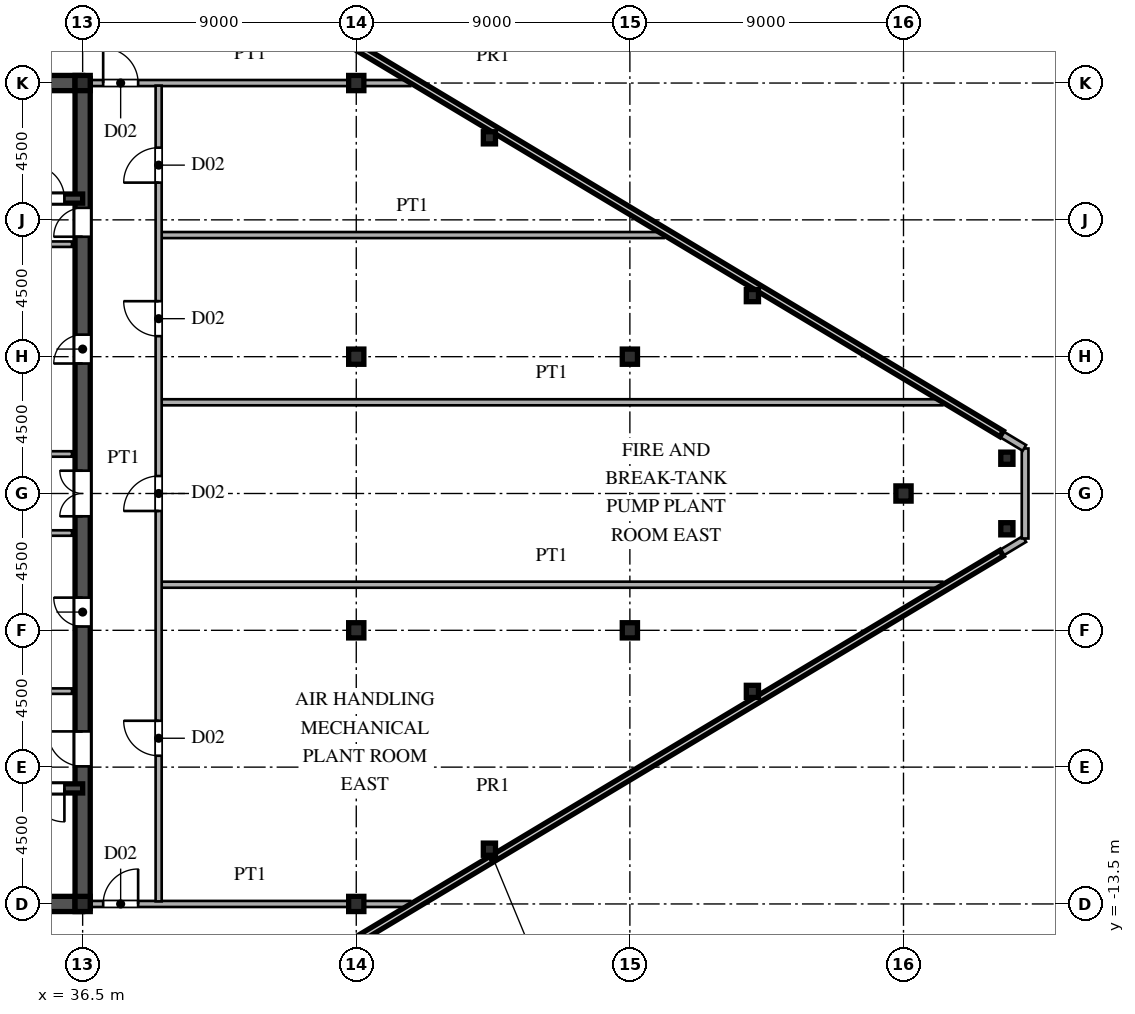
"""IFC4 building model, lengths in metres.
Left out: names, types, materials, properties, quantities, classifications, styles, units other than length and angle.
Written with IfcOpenShell. Run it as: python <this file> out.ifc"""

import sys

from ifc_helpers import new_model, si_unit, direction, frame, frame_2d, origin, origin_2d, place, context, subcontext, project, spatial, rectangle, hollow_rectangle, i_section, extrude, source, transform, mapped, element, fill, save


model = new_model("IFC4")
c1 = context("Model", 3, precision=1e-05, world=origin(), true_north=direction((0.0, 1.0)))
c2 = subcontext(c1, "Body", "Model", "MODEL_VIEW")
j1 = project(units=[si_unit("LENGTHUNIT", "METRE"), si_unit("PLANEANGLEUNIT", "RADIAN")], contexts=[c1])
p1 = place(None, origin())
s1 = spatial("IfcSite", under=j1, at=p1, CompositionType="ELEMENT")
p2 = place(p1, origin())
s2 = spatial("IfcBuilding", under=s1, at=p2, CompositionType="ELEMENT")
p3 = place(p2, frame((0.0, 0.0, 224.7)))
s3 = spatial("IfcBuildingStorey", under=s2, at=p3, CompositionType="ELEMENT", Elevation=224.7)
m1 = source(origin(), c2, "Body", "SweptSolid", [
    extrude(i_section(OverallWidth=0.5, OverallDepth=0.5, WebThickness=0.02, FlangeThickness=0.032, at=origin_2d()), origin(), (0.0, 0.0, 1.0), 5.1),
])
for number, where, z_axis, x_axis in (
    (1, (36.5, -13.5, 0.0), (0.0, 0.0, 1.0), (1.0, 0.0, 0.0)),
    (2, (36.5, 13.5, 0.0), (0.0, 0.0, 1.0), (1.0, 0.0, 0.0)),
    (3, (45.5, -13.5, 0.0), (0.0, 0.0, 1.0), (1.0, 0.0, 0.0)),
    (4, (45.5, -4.5, 0.0), (0.0, 0.0, 1.0), (1.0, 0.0, 0.0)),
    (5, (45.5, 4.5, 0.0), (0.0, 0.0, 1.0), (1.0, 0.0, 0.0)),
    (6, (45.5, 13.5, 0.0), (0.0, 0.0, 1.0), (1.0, 0.0, 0.0)),
    (7, (54.5, -4.5, 0.0), (0.0, 0.0, 1.0), (1.0, 0.0, 0.0)),
    (8, (54.5, 4.5, 0.0), (0.0, 0.0, 1.0), (1.0, 0.0, 0.0)),
    (9, (63.5, 0.0, 0.0), (0.0, 0.0, 1.0), (1.0, 0.0, 0.0)),
):
    element("IfcColumn", number, at=place(p3, frame(where, z_axis=z_axis, x_axis=x_axis)), inside=s3, PredefinedType="COLUMN", context=c2, shape_type="MappedRepresentation", body=[
        mapped(m1, transform((0.0, 0.0, 0.0), scale=1.0)),
    ])
m2 = source(origin(), c2, "Body", "SweptSolid", [
    extrude(hollow_rectangle(XDim=0.4, YDim=0.4, WallThickness=0.016, at=origin_2d()), origin(), (0.0, 0.0, 1.0), 5.1),
])
for number, where, z_axis, x_axis in (
    (10, (66.9, -1.16, 0.0), (0.0, 0.0, 1.0), (1.0, 0.0, 0.0)),
    (11, (66.9, 1.16, 0.0), (0.0, 0.0, 1.0), (1.0, 0.0, 0.0)),
    (12, (49.88, -11.699, 0.0), (0.0, 0.0, 1.0), (1.0, 0.0, 0.0)),
    (13, (58.53, -6.509, 0.0), (0.0, 0.0, 1.0), (1.0, 0.0, 0.0)),
    (14, (49.88, 11.699, 0.0), (0.0, 0.0, 1.0), (1.0, 0.0, 0.0)),
    (15, (58.53, 6.509, 0.0), (0.0, 0.0, 1.0), (1.0, 0.0, 0.0)),
):
    element("IfcColumn", number, at=place(p3, frame(where, z_axis=z_axis, x_axis=x_axis)), inside=s3, PredefinedType="COLUMN", context=c2, shape_type="MappedRepresentation", body=[
        mapped(m2, transform((0.0, 0.0, 0.0), scale=1.0)),
    ])
p4 = place(p3, frame((32.517, -22.49, 0.0), z_axis=(0.0, 0.0, 1.0), x_axis=(0.857492925713, 0.514495755428, 0.0)))
e16 = element("IfcWall", 16, at=p4, inside=s3, PredefinedType="PARAPET", context=c2, shape_type="SweptSolid", body=[
    extrude(rectangle(XDim=40.777, YDim=0.22, at=frame_2d((20.388, 0.0))), origin(), (0.0, 0.0, 1.0), 1.25),
])
p5 = place(p3, frame((67.5, -1.48, 0.0), z_axis=(0.0, 0.0, 1.0), x_axis=(0.0, 1.0, 0.0)))
e17 = element("IfcWall", 17, at=p5, inside=s3, PredefinedType="PARAPET", context=c2, shape_type="SweptSolid", body=[
    extrude(rectangle(XDim=2.96, YDim=0.22, at=frame_2d((1.48, 0.0))), origin(), (0.0, 0.0, 1.0), 1.25),
])
p6 = place(p3, frame((67.483, 1.51, 0.0), z_axis=(0.0, 0.0, 1.0), x_axis=(-0.857492925713, 0.514495755428, 0.0)))
e18 = element("IfcWall", 18, at=p6, inside=s3, PredefinedType="PARAPET", context=c2, shape_type="SweptSolid", body=[
    extrude(rectangle(XDim=40.777, YDim=0.22, at=frame_2d((20.388, 0.0))), origin(), (0.0, 0.0, 1.0), 1.25),
])
for number, where, z_axis, x_axis in (
    (19, (27.5, -13.5, 0.0), (0.0, 0.0, 1.0), (1.0, 0.0, 0.0)),
    (20, (27.5, 13.5, 0.0), (0.0, 0.0, 1.0), (1.0, 0.0, 0.0)),
):
    element("IfcWall", number, at=place(p3, frame(where, z_axis=z_axis, x_axis=x_axis)), inside=s3, PredefinedType="SHEAR", context=c2, shape_type="SweptSolid", body=[
        extrude(rectangle(XDim=9.0, YDim=0.5, at=frame_2d((4.5, 0.0))), origin(), (0.0, 0.0, 1.0), 4.84),
    ])
p7 = place(p3, frame((36.5, -13.65, 0.0), z_axis=(0.0, 0.0, 1.0), x_axis=(0.0, 1.0, 0.0)))
e21 = element("IfcWall", 21, at=p7, inside=s3, PredefinedType="SHEAR", context=c2, shape_type="SweptSolid", body=[
    extrude(rectangle(XDim=7.15, YDim=0.5, at=frame_2d((3.575, 0.0))), origin(), (0.0, 0.0, 1.0), 4.84),
])
p8 = place(p7, frame((4.675, 0.0, 0.0)))
e22 = element("IfcOpeningElement", 22, at=p8, cuts=e21, PredefinedType="OPENING", context=c2, shape_type="SweptSolid", body=[
    extrude(rectangle(XDim=1.15, YDim=2.2, at=frame_2d((0.575, 1.1))), frame((0.0, 0.26, 0.0), z_axis=(0.0, -1.0, 0.0), x_axis=(1.0, 0.0, 0.0)), (0.0, 0.0, 1.0), 0.52),
])
p9 = place(p3, frame((36.5, -1.3, 0.0), z_axis=(0.0, 0.0, 1.0), x_axis=(0.0, 1.0, 0.0)))
e23 = element("IfcWall", 23, at=p9, inside=s3, PredefinedType="SHEAR", context=c2, shape_type="SweptSolid", body=[
    extrude(rectangle(XDim=2.6, YDim=0.5, at=frame_2d((1.3, 0.0))), origin(), (0.0, 0.0, 1.0), 4.84),
])
p10 = place(p9, frame((0.55, 0.0, 0.0)))
e24 = element("IfcOpeningElement", 24, at=p10, cuts=e23, PredefinedType="OPENING", context=c2, shape_type="SweptSolid", body=[
    extrude(rectangle(XDim=1.5, YDim=2.3, at=frame_2d((0.75, 1.15))), frame((0.0, 0.26, 0.0), z_axis=(0.0, -1.0, 0.0), x_axis=(1.0, 0.0, 0.0)), (0.0, 0.0, 1.0), 0.52),
])
p11 = place(p3, frame((36.5, 8.2, 0.0), z_axis=(0.0, 0.0, 1.0), x_axis=(0.0, 1.0, 0.0)))
e25 = element("IfcWall", 25, at=p11, inside=s3, PredefinedType="SHEAR", context=c2, shape_type="SweptSolid", body=[
    extrude(rectangle(XDim=5.45, YDim=0.5, at=frame_2d((2.725, 0.0))), origin(), (0.0, 0.0, 1.0), 4.84),
])
p12 = place(p11, frame((0.245, 0.0, 0.0)))
e26 = element("IfcOpeningElement", 26, at=p12, cuts=e25, PredefinedType="OPENING", context=c2, shape_type="SweptSolid", body=[
    extrude(rectangle(XDim=0.95, YDim=2.15, at=frame_2d((0.475, 1.075))), frame((0.0, 0.26, 0.0), z_axis=(0.0, -1.0, 0.0), x_axis=(1.0, 0.0, 0.0)), (0.0, 0.0, 1.0), 0.52),
])
p13 = place(p3, frame((36.5, -6.5, 0.0), z_axis=(0.0, 0.0, 1.0), x_axis=(0.0, 1.0, 0.0)))
e27 = element("IfcWall", 27, at=p13, inside=s3, PredefinedType="SHEAR", context=c2, shape_type="SweptSolid", body=[
    extrude(rectangle(XDim=5.2, YDim=0.5, at=frame_2d((2.6, 0.0))), origin(), (0.0, 0.0, 1.0), 4.84),
])
p14 = place(p13, frame((2.125, 0.0, 0.0)))
e28 = element("IfcOpeningElement", 28, at=p14, cuts=e27, PredefinedType="OPENING", context=c2, shape_type="SweptSolid", body=[
    extrude(rectangle(XDim=0.95, YDim=2.15, at=frame_2d((0.475, 1.075))), frame((0.0, 0.26, 0.0), z_axis=(0.0, -1.0, 0.0), x_axis=(1.0, 0.0, 0.0)), (0.0, 0.0, 1.0), 0.52),
])
p15 = place(p3, frame((36.5, 1.3, 0.0), z_axis=(0.0, 0.0, 1.0), x_axis=(0.0, 1.0, 0.0)))
e29 = element("IfcWall", 29, at=p15, inside=s3, PredefinedType="SHEAR", context=c2, shape_type="SweptSolid", body=[
    extrude(rectangle(XDim=6.9, YDim=0.5, at=frame_2d((3.45, 0.0))), origin(), (0.0, 0.0, 1.0), 4.84),
])
p16 = place(p15, frame((2.975, 0.0, 0.0)))
e30 = element("IfcOpeningElement", 30, at=p16, cuts=e29, PredefinedType="OPENING", context=c2, shape_type="SweptSolid", body=[
    extrude(rectangle(XDim=0.95, YDim=2.15, at=frame_2d((0.475, 1.075))), frame((0.0, 0.26, 0.0), z_axis=(0.0, -1.0, 0.0), x_axis=(1.0, 0.0, 0.0)), (0.0, 0.0, 1.0), 0.52),
])
p17 = place(p3, frame((27.5, -9.7, 0.0), z_axis=(0.0, 0.0, 1.0), x_axis=(1.0, 0.0, 0.0)))
e31 = element("IfcWall", 31, at=p17, inside=s3, PredefinedType="SHEAR", context=c2, shape_type="SweptSolid", body=[
    extrude(rectangle(XDim=9.0, YDim=0.3, at=frame_2d((4.5, 0.0))), origin(), (0.0, 0.0, 1.0), 4.84),
])
p18 = place(p17, frame((7.3, 0.0, 0.0)))
e32 = element("IfcOpeningElement", 32, at=p18, cuts=e31, PredefinedType="OPENING", context=c2, shape_type="SweptSolid", body=[
    extrude(rectangle(XDim=1.1, YDim=2.2, at=frame_2d((0.55, 1.1))), frame((0.0, 0.16, 0.0), z_axis=(0.0, -1.0, 0.0), x_axis=(1.0, 0.0, 0.0)), (0.0, 0.0, 1.0), 0.32),
])
p19 = place(p3, frame((27.5, 9.7, 0.0), z_axis=(0.0, 0.0, 1.0), x_axis=(1.0, 0.0, 0.0)))
e33 = element("IfcWall", 33, at=p19, inside=s3, PredefinedType="SHEAR", context=c2, shape_type="SweptSolid", body=[
    extrude(rectangle(XDim=9.0, YDim=0.3, at=frame_2d((4.5, 0.0))), origin(), (0.0, 0.0, 1.0), 4.84),
])
p20 = place(p19, frame((7.3, 0.0, 0.0)))
e34 = element("IfcOpeningElement", 34, at=p20, cuts=e33, PredefinedType="OPENING", context=c2, shape_type="SweptSolid", body=[
    extrude(rectangle(XDim=1.1, YDim=2.2, at=frame_2d((0.55, 1.1))), frame((0.0, 0.16, 0.0), z_axis=(0.0, -1.0, 0.0), x_axis=(1.0, 0.0, 0.0)), (0.0, 0.0, 1.0), 0.32),
])
for number, where, z_axis, x_axis in (
    (35, (30.45, -6.5, 0.0), (0.0, 0.0, 1.0), (1.0, 0.0, 0.0)),
    (36, (30.45, 8.2, 0.0), (0.0, 0.0, 1.0), (1.0, 0.0, 0.0)),
):
    element("IfcWall", number, at=place(p3, frame(where, z_axis=z_axis, x_axis=x_axis)), inside=s3, PredefinedType="PARTITIONING", context=c2, shape_type="SweptSolid", body=[
        extrude(rectangle(XDim=5.7, YDim=0.18, at=frame_2d((2.85, 0.0))), origin(), (0.0, 0.0, 1.0), 4.84),
    ])
for number, where, z_axis, x_axis in (
    (37, (33.2, -1.3, 0.0), (0.0, 0.0, 1.0), (1.0, 0.0, 0.0)),
    (38, (33.2, 1.3, 0.0), (0.0, 0.0, 1.0), (1.0, 0.0, 0.0)),
):
    element("IfcWall", number, at=place(p3, frame(where, z_axis=z_axis, x_axis=x_axis)), inside=s3, PredefinedType="PARTITIONING", context=c2, shape_type="SweptSolid", body=[
        extrude(rectangle(XDim=2.95, YDim=0.18, at=frame_2d((1.475, 0.0))), origin(), (0.0, 0.0, 1.0), 4.84),
    ])
p21 = place(p3, frame((36.755, -13.5, 0.0), z_axis=(0.0, 0.0, 1.0), x_axis=(1.0, 0.0, 0.0)))
e39 = element("IfcWall", 39, at=p21, inside=s3, PredefinedType="PARTITIONING", context=c2, shape_type="SweptSolid", body=[
    extrude(rectangle(XDim=8.765, YDim=0.2, at=frame_2d((4.383, 0.0))), origin(), (0.0, 0.0, 1.0), 4.24),
])
p22 = place(p21, frame((0.42, 0.0, 0.0)))
e40 = element("IfcOpeningElement", 40, at=p22, cuts=e39, PredefinedType="OPENING", context=c2, shape_type="SweptSolid", body=[
    extrude(rectangle(XDim=1.15, YDim=2.2, at=frame_2d((0.575, 1.1))), frame((0.0, 0.11, 0.0), z_axis=(0.0, -1.0, 0.0), x_axis=(1.0, 0.0, 0.0)), (0.0, 0.0, 1.0), 0.22),
])
p23 = place(p3, frame((45.52, -13.5, 0.0), z_axis=(0.0, 0.0, 1.0), x_axis=(1.0, 0.0, 0.0)))
e41 = element("IfcWall", 41, at=p23, inside=s3, PredefinedType="PARTITIONING", context=c2, shape_type="SweptSolid", body=[
    extrude(rectangle(XDim=1.757, YDim=0.2, at=frame_2d((0.878, 0.0))), origin(), (0.0, 0.0, 1.0), 4.84),
])
for number, where, z_axis, x_axis in (
    (42, (39.085, -3.0, 0.0), (0.0, 0.0, 1.0), (1.0, 0.0, 0.0)),
    (43, (39.085, 3.0, 0.0), (0.0, 0.0, 1.0), (1.0, 0.0, 0.0)),
):
    element("IfcWall", number, at=place(p3, frame(where, z_axis=z_axis, x_axis=x_axis)), inside=s3, PredefinedType="PARTITIONING", context=c2, shape_type="SweptSolid", body=[
        extrude(rectangle(XDim=25.692, YDim=0.2, at=frame_2d((12.846, 0.0))), origin(), (0.0, 0.0, 1.0), 4.84),
    ])
p24 = place(p3, frame((39.085, 8.5, 0.0), z_axis=(0.0, 0.0, 1.0), x_axis=(1.0, 0.0, 0.0)))
e44 = element("IfcWall", 44, at=p24, inside=s3, PredefinedType="PARTITIONING", context=c2, shape_type="SweptSolid", body=[
    extrude(rectangle(XDim=16.525, YDim=0.2, at=frame_2d((8.262, 0.0))), origin(), (0.0, 0.0, 1.0), 4.84),
])
p25 = place(p3, frame((36.755, 13.5, 0.0), z_axis=(0.0, 0.0, 1.0), x_axis=(1.0, 0.0, 0.0)))
e45 = element("IfcWall", 45, at=p25, inside=s3, PredefinedType="PARTITIONING", context=c2, shape_type="SweptSolid", body=[
    extrude(rectangle(XDim=8.765, YDim=0.2, at=frame_2d((4.383, 0.0))), origin(), (0.0, 0.0, 1.0), 4.24),
])
p26 = place(p25, frame((0.42, 0.0, 0.0)))
e46 = element("IfcOpeningElement", 46, at=p26, cuts=e45, PredefinedType="OPENING", context=c2, shape_type="SweptSolid", body=[
    extrude(rectangle(XDim=1.15, YDim=2.2, at=frame_2d((0.575, 1.1))), frame((0.0, 0.11, 0.0), z_axis=(0.0, -1.0, 0.0), x_axis=(1.0, 0.0, 0.0)), (0.0, 0.0, 1.0), 0.22),
])
p27 = place(p3, frame((45.52, 13.5, 0.0), z_axis=(0.0, 0.0, 1.0), x_axis=(1.0, 0.0, 0.0)))
e47 = element("IfcWall", 47, at=p27, inside=s3, PredefinedType="PARTITIONING", context=c2, shape_type="SweptSolid", body=[
    extrude(rectangle(XDim=1.757, YDim=0.2, at=frame_2d((0.878, 0.0))), origin(), (0.0, 0.0, 1.0), 4.84),
])
p28 = place(p3, frame((39.0, -13.415, 0.0), z_axis=(0.0, 0.0, 1.0), x_axis=(0.0, 1.0, 0.0)))
e48 = element("IfcWall", 48, at=p28, inside=s3, PredefinedType="PARTITIONING", context=c2, shape_type="SweptSolid", body=[
    extrude(rectangle(XDim=26.83, YDim=0.2, at=frame_2d((13.415, 0.0))), origin(), (0.0, 0.0, 1.0), 4.84),
])
p29 = place(p28, frame((4.79, 0.0, 0.0)))
e49 = element("IfcOpeningElement", 49, at=p29, cuts=e48, PredefinedType="OPENING", context=c2, shape_type="SweptSolid", body=[
    extrude(rectangle(XDim=1.15, YDim=2.2, at=frame_2d((0.575, 1.1))), frame((0.0, 0.11, 0.0), z_axis=(0.0, -1.0, 0.0), x_axis=(1.0, 0.0, 0.0)), (0.0, 0.0, 1.0), 0.22),
])
p30 = place(p28, frame((12.84, 0.0, 0.0)))
e50 = element("IfcOpeningElement", 50, at=p30, cuts=e48, PredefinedType="OPENING", context=c2, shape_type="SweptSolid", body=[
    extrude(rectangle(XDim=1.15, YDim=2.2, at=frame_2d((0.575, 1.1))), frame((0.0, 0.11, 0.0), z_axis=(0.0, -1.0, 0.0), x_axis=(1.0, 0.0, 0.0)), (0.0, 0.0, 1.0), 0.22),
])
p31 = place(p28, frame((18.59, 0.0, 0.0)))
e51 = element("IfcOpeningElement", 51, at=p31, cuts=e48, PredefinedType="OPENING", context=c2, shape_type="SweptSolid", body=[
    extrude(rectangle(XDim=1.15, YDim=2.2, at=frame_2d((0.575, 1.1))), frame((0.0, 0.11, 0.0), z_axis=(0.0, -1.0, 0.0), x_axis=(1.0, 0.0, 0.0)), (0.0, 0.0, 1.0), 0.22),
])
p32 = place(p28, frame((23.64, 0.0, 0.0)))
e52 = element("IfcOpeningElement", 52, at=p32, cuts=e48, PredefinedType="OPENING", context=c2, shape_type="SweptSolid", body=[
    extrude(rectangle(XDim=1.15, YDim=2.2, at=frame_2d((0.575, 1.1))), frame((0.0, 0.11, 0.0), z_axis=(0.0, -1.0, 0.0), x_axis=(1.0, 0.0, 0.0)), (0.0, 0.0, 1.0), 0.22),
])
m3 = source(origin(), c2, "Body", "SweptSolid", [
    extrude(rectangle(XDim=1.15, YDim=2.2, at=frame_2d((0.575, 1.1))), frame((0.0, 0.025, 0.0), z_axis=(0.0, -1.0, 0.0), x_axis=(1.0, 0.0, 0.0)), (0.0, 0.0, 1.0), 0.05),
])
p33 = place(p8, origin())
e53 = element("IfcDoor", 53, at=p33, inside=s3, OperationType="SINGLE_SWING_RIGHT", PredefinedType="DOOR", context=c2, shape_type="MappedRepresentation", body=[
    mapped(m3, transform((0.0, 0.0, 0.0), scale=1.0)),
])
fill(e22, e53)
m4 = source(origin(), c2, "Body", "SweptSolid", [
    extrude(rectangle(XDim=1.5, YDim=2.3, at=frame_2d((0.75, 1.15))), frame((0.0, 0.025, 0.0), z_axis=(0.0, -1.0, 0.0), x_axis=(1.0, 0.0, 0.0)), (0.0, 0.0, 1.0), 0.05),
])
p34 = place(p10, origin())
e54 = element("IfcDoor", 54, at=p34, inside=s3, OperationType="DOUBLE_SWING_LEFT", PredefinedType="DOOR", context=c2, shape_type="MappedRepresentation", body=[
    mapped(m4, transform((0.0, 0.0, 0.0), scale=1.0)),
])
fill(e24, e54)
m5 = source(origin(), c2, "Body", "SweptSolid", [
    extrude(rectangle(XDim=0.95, YDim=2.15, at=frame_2d((0.475, 1.075))), frame((0.0, 0.025, 0.0), z_axis=(0.0, -1.0, 0.0), x_axis=(1.0, 0.0, 0.0)), (0.0, 0.0, 1.0), 0.05),
])
p35 = place(p12, origin())
e55 = element("IfcDoor", 55, at=p35, inside=s3, OperationType="SINGLE_SWING_LEFT", PredefinedType="DOOR", context=c2, shape_type="MappedRepresentation", body=[
    mapped(m5, transform((0.0, 0.0, 0.0), scale=1.0)),
])
fill(e26, e55)
p36 = place(p14, origin())
e56 = element("IfcDoor", 56, at=p36, inside=s3, OperationType="SINGLE_SWING_RIGHT", PredefinedType="DOOR", context=c2, shape_type="MappedRepresentation", body=[
    mapped(m5, transform((0.0, 0.0, 0.0), scale=1.0)),
])
fill(e28, e56)
p37 = place(p16, origin())
e57 = element("IfcDoor", 57, at=p37, inside=s3, OperationType="SINGLE_SWING_LEFT", PredefinedType="DOOR", context=c2, shape_type="MappedRepresentation", body=[
    mapped(m5, transform((0.0, 0.0, 0.0), scale=1.0)),
])
fill(e30, e57)
m6 = source(origin(), c2, "Body", "SweptSolid", [
    extrude(rectangle(XDim=1.1, YDim=2.2, at=frame_2d((0.55, 1.1))), frame((0.0, 0.025, 0.0), z_axis=(0.0, -1.0, 0.0), x_axis=(1.0, 0.0, 0.0)), (0.0, 0.0, 1.0), 0.05),
])
p38 = place(p18, frame((1.1, 0.0, 0.0), z_axis=(0.0, 0.0, 1.0), x_axis=(-1.0, 0.0, 0.0)))
e58 = element("IfcDoor", 58, at=p38, inside=s3, OperationType="SINGLE_SWING_RIGHT", PredefinedType="DOOR", context=c2, shape_type="MappedRepresentation", body=[
    mapped(m6, transform((0.0, 0.0, 0.0), scale=1.0)),
])
fill(e32, e58)
p39 = place(p20, origin())
e59 = element("IfcDoor", 59, at=p39, inside=s3, OperationType="SINGLE_SWING_LEFT", PredefinedType="DOOR", context=c2, shape_type="MappedRepresentation", body=[
    mapped(m6, transform((0.0, 0.0, 0.0), scale=1.0)),
])
fill(e34, e59)
p40 = place(p22, origin())
e60 = element("IfcDoor", 60, at=p40, inside=s3, OperationType="SINGLE_SWING_RIGHT", PredefinedType="DOOR", context=c2, shape_type="MappedRepresentation", body=[
    mapped(m3, transform((0.0, 0.0, 0.0), scale=1.0)),
])
fill(e40, e60)
p41 = place(p26, origin())
e61 = element("IfcDoor", 61, at=p41, inside=s3, OperationType="SINGLE_SWING_LEFT", PredefinedType="DOOR", context=c2, shape_type="MappedRepresentation", body=[
    mapped(m3, transform((0.0, 0.0, 0.0), scale=1.0)),
])
fill(e46, e61)
p42 = place(p29, origin())
e62 = element("IfcDoor", 62, at=p42, inside=s3, OperationType="SINGLE_SWING_RIGHT", PredefinedType="DOOR", context=c2, shape_type="MappedRepresentation", body=[
    mapped(m3, transform((0.0, 0.0, 0.0), scale=1.0)),
])
fill(e49, e62)
p43 = place(p30, origin())
e63 = element("IfcDoor", 63, at=p43, inside=s3, OperationType="SINGLE_SWING_LEFT", PredefinedType="DOOR", context=c2, shape_type="MappedRepresentation", body=[
    mapped(m3, transform((0.0, 0.0, 0.0), scale=1.0)),
])
fill(e50, e63)
p44 = place(p31, origin())
e64 = element("IfcDoor", 64, at=p44, inside=s3, OperationType="SINGLE_SWING_RIGHT", PredefinedType="DOOR", context=c2, shape_type="MappedRepresentation", body=[
    mapped(m3, transform((0.0, 0.0, 0.0), scale=1.0)),
])
fill(e51, e64)
p45 = place(p32, origin())
e65 = element("IfcDoor", 65, at=p45, inside=s3, OperationType="SINGLE_SWING_LEFT", PredefinedType="DOOR", context=c2, shape_type="MappedRepresentation", body=[
    mapped(m3, transform((0.0, 0.0, 0.0), scale=1.0)),
])
fill(e52, e65)
save(model, sys.argv[1])
